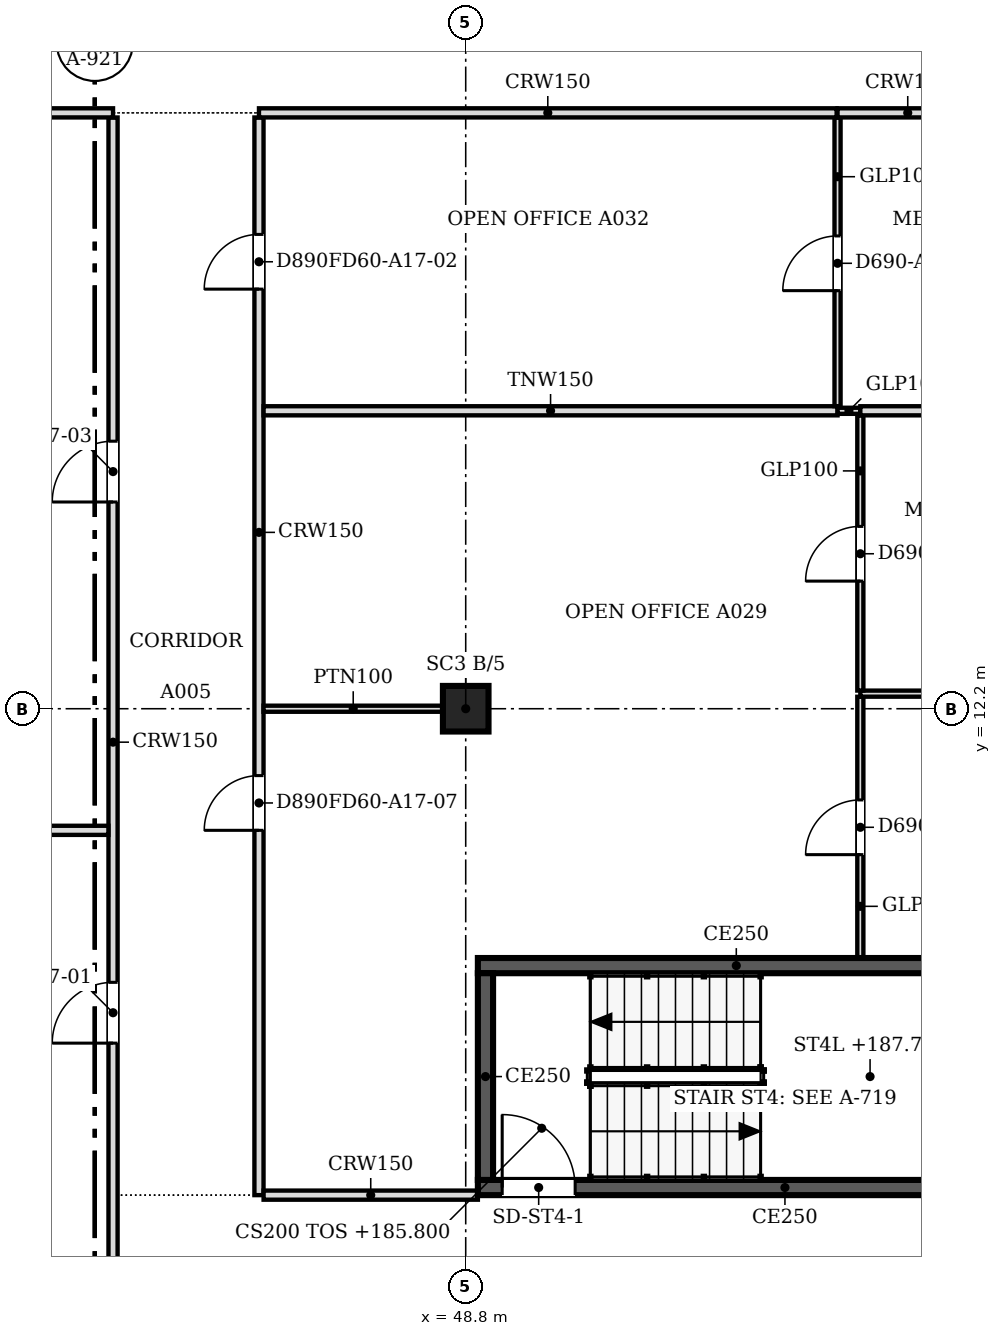
"""IFC4 building model, lengths in metres.
Left out: names, types, materials, properties, quantities, classifications, styles, units other than length and angle.
Written with IfcOpenShell. Run it as: python <this file> out.ifc"""

import sys

from ifc_helpers import new_model, si_unit, direction, frame, frame_2d, origin, origin_2d, place, context, subcontext, project, spatial, rectangle, extrude, source, transform, mapped, element, fill, save


model = new_model("IFC4")
c1 = context("Model", 3, precision=1e-05, world=origin(), true_north=direction((0.0, 1.0)))
c2 = subcontext(c1, "Body", "Model", "MODEL_VIEW")
j1 = project(units=[si_unit("LENGTHUNIT", "METRE"), si_unit("PLANEANGLEUNIT", "RADIAN")], contexts=[c1])
p1 = place(None, origin())
s1 = spatial("IfcSite", under=j1, at=p1, CompositionType="ELEMENT")
p2 = place(p1, origin())
s2 = spatial("IfcBuilding", under=s1, at=p2, CompositionType="ELEMENT")
p3 = place(p2, frame((0.0, 0.0, 185.8)))
s3 = spatial("IfcBuildingStorey", under=s2, at=p3, CompositionType="ELEMENT", Elevation=185.8)
p4 = place(p3, frame((48.8, 12.2, 0.0), z_axis=(0.0, 0.0, 1.0), x_axis=(1.0, 0.0, 0.0)))
e1 = element("IfcColumn", 1, at=p4, inside=s3, PredefinedType="COLUMN", context=c2, shape_type="SweptSolid", body=[
    extrude(rectangle(XDim=0.75, YDim=0.75, at=origin_2d()), origin(), (0.0, 0.0, 1.0), 3.6),
])
p5 = place(p3, frame((57.5, 4.325, 0.0), z_axis=(0.0, 0.0, 1.0), x_axis=(-1.0, 0.0, 0.0)))
e2 = element("IfcWall", 2, at=p5, inside=s3, PredefinedType="SOLIDWALL", context=c2, shape_type="SweptSolid", body=[
    extrude(rectangle(XDim=8.5, YDim=0.25, at=frame_2d((4.25, 0.0))), origin(), (0.0, 0.0, 1.0), 3.8),
])
m1 = source(origin(), c2, "Body", "SweptSolid", [
    extrude(rectangle(XDim=1.2, YDim=2.1, at=frame_2d((0.6, 1.05))), frame((0.0, 0.135, 0.0), z_axis=(0.0, -1.0, 0.0), x_axis=(1.0, 0.0, 0.0)), (0.0, 0.0, 1.0), 0.27),
])
p6 = place(p5, frame((6.9, 0.0, 0.0)))
e3 = element("IfcOpeningElement", 3, at=p6, cuts=e2, PredefinedType="OPENING", context=c2, shape_type="MappedRepresentation", body=[
    mapped(m1, transform((0.0, 0.0, 0.0), scale=1.0)),
])
p7 = place(p3, frame((49.125, 4.45, 0.0), z_axis=(0.0, 0.0, 1.0), x_axis=(0.0, 1.0, 0.0)))
e4 = element("IfcWall", 4, at=p7, inside=s3, PredefinedType="SOLIDWALL", context=c2, shape_type="SweptSolid", body=[
    extrude(rectangle(XDim=3.4, YDim=0.25, at=frame_2d((1.7, 0.0))), origin(), (0.0, 0.0, 1.0), 3.8),
])
p8 = place(p3, frame((49.0, 7.975, 0.0), z_axis=(0.0, 0.0, 1.0), x_axis=(1.0, 0.0, 0.0)))
e5 = element("IfcWall", 5, at=p8, inside=s3, PredefinedType="SOLIDWALL", context=c2, shape_type="SweptSolid", body=[
    extrude(rectangle(XDim=8.5, YDim=0.25, at=frame_2d((4.25, 0.0))), origin(), (0.0, 0.0, 1.0), 3.8),
])
p9 = place(p3, frame((43.0, 0.5, 0.0), z_axis=(0.0, 0.0, 1.0), x_axis=(0.0, 1.0, 0.0)))
e6 = element("IfcWall", 6, at=p9, inside=s3, PredefinedType="PARTITIONING", context=c2, shape_type="SweptSolid", body=[
    extrude(rectangle(XDim=21.424, YDim=0.15, at=frame_2d((10.712, 0.0))), origin(), (0.0, 0.0, 1.0), 3.067),
])
m2 = source(origin(), c2, "Body", "SweptSolid", [
    extrude(rectangle(XDim=1.0, YDim=2.1, at=frame_2d((0.5, 1.05))), frame((0.0, 0.085, 0.0), z_axis=(0.0, -1.0, 0.0), x_axis=(1.0, 0.0, 0.0)), (0.0, 0.0, 1.0), 0.17),
])
p10 = place(p9, frame((6.2, 0.0, 0.0)))
e7 = element("IfcOpeningElement", 7, at=p10, cuts=e6, PredefinedType="OPENING", context=c2, shape_type="MappedRepresentation", body=[
    mapped(m2, transform((0.0, 0.0, 0.0), scale=1.0)),
])
p11 = place(p9, frame((15.1, 0.0, 0.0)))
e8 = element("IfcOpeningElement", 8, at=p11, cuts=e6, PredefinedType="OPENING", context=c2, shape_type="MappedRepresentation", body=[
    mapped(m2, transform((0.0, 0.0, 0.0), scale=1.0)),
])
p12 = place(p3, frame((45.4, 21.924, 0.0), z_axis=(0.0, 0.0, 1.0), x_axis=(0.0, -1.0, 0.0)))
e9 = element("IfcWall", 9, at=p12, inside=s3, PredefinedType="PARTITIONING", context=c2, shape_type="SweptSolid", body=[
    extrude(rectangle(XDim=17.724, YDim=0.15, at=frame_2d((8.862, 0.0))), origin(), (0.0, 0.0, 1.0), 3.067),
])
m3 = source(origin(), c2, "Body", "SweptSolid", [
    extrude(rectangle(XDim=0.9, YDim=2.1, at=frame_2d((0.45, 1.05))), frame((0.0, 0.085, 0.0), z_axis=(0.0, -1.0, 0.0), x_axis=(1.0, 0.0, 0.0)), (0.0, 0.0, 1.0), 0.17),
])
p13 = place(p12, frame((1.923, 0.0, 0.0)))
e10 = element("IfcOpeningElement", 10, at=p13, cuts=e9, PredefinedType="OPENING", context=c2, shape_type="MappedRepresentation", body=[
    mapped(m3, transform((0.0, 0.0, 0.0), scale=1.0)),
])
p14 = place(p12, frame((10.824, 0.0, 0.0)))
e11 = element("IfcOpeningElement", 11, at=p14, cuts=e9, PredefinedType="OPENING", context=c2, shape_type="MappedRepresentation", body=[
    mapped(m3, transform((0.0, 0.0, 0.0), scale=1.0)),
])
p15 = place(p3, frame((45.476, 4.2, 0.0), z_axis=(0.0, 0.0, 1.0), x_axis=(1.0, 0.0, 0.0)))
e12 = element("IfcWall", 12, at=p15, inside=s3, PredefinedType="PARTITIONING", context=c2, shape_type="SweptSolid", body=[
    extrude(rectangle(XDim=3.524, YDim=0.15, at=frame_2d((1.762, 0.0))), origin(), (0.0, 0.0, 1.0), 3.067),
])
p16 = place(p3, frame((55.29, 12.397, 0.0), z_axis=(0.0, 0.0, 1.0), x_axis=(0.0, -1.0, 0.0)))
e13 = element("IfcWall", 13, at=p16, inside=s3, PredefinedType="PARTITIONING", context=c2, shape_type="SweptSolid", body=[
    extrude(rectangle(XDim=4.297, YDim=0.1, at=frame_2d((2.148, 0.0))), origin(), (0.0, 0.0, 1.0), 3.067),
])
m4 = source(origin(), c2, "Body", "SweptSolid", [
    extrude(rectangle(XDim=0.9, YDim=2.1, at=frame_2d((0.45, 1.05))), frame((0.0, 0.06, 0.0), z_axis=(0.0, -1.0, 0.0), x_axis=(1.0, 0.0, 0.0)), (0.0, 0.0, 1.0), 0.12),
])
p17 = place(p16, frame((1.697, 0.0, 0.0)))
e14 = element("IfcOpeningElement", 14, at=p17, cuts=e13, PredefinedType="OPENING", context=c2, shape_type="MappedRepresentation", body=[
    mapped(m4, transform((0.0, 0.0, 0.0), scale=1.0)),
])
p18 = place(p3, frame((24.9, 10.2, 0.0), z_axis=(0.0, 0.0, 1.0), x_axis=(1.0, 0.0, 0.0)))
e15 = element("IfcWall", 15, at=p18, inside=s3, PredefinedType="PARTITIONING", context=c2, shape_type="SweptSolid", body=[
    extrude(rectangle(XDim=18.024, YDim=0.15, at=frame_2d((9.012, 0.0))), origin(), (0.0, 0.0, 1.0), 3.067),
])
p19 = place(p3, frame((48.425, 12.2, 0.0), z_axis=(0.0, 0.0, 1.0), x_axis=(-1.0, 0.0, 0.0)))
e16 = element("IfcWall", 16, at=p19, inside=s3, PredefinedType="PARTITIONING", context=c2, shape_type="SweptSolid", body=[
    extrude(rectangle(XDim=2.95, YDim=0.1, at=frame_2d((1.475, 0.0))), origin(), (0.0, 0.0, 1.0), 3.067),
])
p20 = place(p3, frame((55.29, 12.448, 0.0), z_axis=(0.0, 0.0, 1.0), x_axis=(1.0, 0.0, 0.0)))
e17 = element("IfcWall", 17, at=p20, inside=s3, PredefinedType="PARTITIONING", context=c2, shape_type="SweptSolid", body=[
    extrude(rectangle(XDim=5.21, YDim=0.1, at=frame_2d((2.605, 0.0))), origin(), (0.0, 0.0, 1.0), 3.067),
])
p21 = place(p3, frame((55.29, 17.024, 0.0), z_axis=(0.0, 0.0, 1.0), x_axis=(0.0, -1.0, 0.0)))
e18 = element("IfcWall", 18, at=p21, inside=s3, PredefinedType="PARTITIONING", context=c2, shape_type="SweptSolid", body=[
    extrude(rectangle(XDim=4.525, YDim=0.1, at=frame_2d((2.263, 0.0))), origin(), (0.0, 0.0, 1.0), 3.067),
])
p22 = place(p21, frame((1.825, 0.0, 0.0)))
e19 = element("IfcOpeningElement", 19, at=p22, cuts=e18, PredefinedType="OPENING", context=c2, shape_type="MappedRepresentation", body=[
    mapped(m4, transform((0.0, 0.0, 0.0), scale=1.0)),
])
p23 = place(p3, frame((45.476, 17.1, 0.0), z_axis=(0.0, 0.0, 1.0), x_axis=(1.0, 0.0, 0.0)))
e20 = element("IfcWall", 20, at=p23, inside=s3, PredefinedType="PARTITIONING", context=c2, shape_type="SweptSolid", body=[
    extrude(rectangle(XDim=9.439, YDim=0.15, at=frame_2d((4.719, 0.0))), origin(), (0.0, 0.0, 1.0), 3.067),
])
p24 = place(p3, frame((54.916, 17.1, 0.0), z_axis=(0.0, 0.0, 1.0), x_axis=(1.0, 0.0, 0.0)))
e21 = element("IfcWall", 21, at=p24, inside=s3, PredefinedType="PARTITIONING", context=c2, shape_type="SweptSolid", body=[
    extrude(rectangle(XDim=0.373, YDim=0.1, at=frame_2d((0.187, 0.0))), origin(), (0.0, 0.0, 1.0), 3.067),
])
p25 = place(p3, frame((55.29, 17.1, 0.0), z_axis=(0.0, 0.0, 1.0), x_axis=(1.0, 0.0, 0.0)))
e22 = element("IfcWall", 22, at=p25, inside=s3, PredefinedType="PARTITIONING", context=c2, shape_type="SweptSolid", body=[
    extrude(rectangle(XDim=5.21, YDim=0.15, at=frame_2d((2.605, 0.0))), origin(), (0.0, 0.0, 1.0), 3.067),
])
p26 = place(p3, frame((54.915, 21.924, 0.0), z_axis=(0.0, 0.0, 1.0), x_axis=(0.0, -1.0, 0.0)))
e23 = element("IfcWall", 23, at=p26, inside=s3, PredefinedType="PARTITIONING", context=c2, shape_type="SweptSolid", body=[
    extrude(rectangle(XDim=4.748, YDim=0.1, at=frame_2d((2.374, 0.0))), origin(), (0.0, 0.0, 1.0), 3.067),
])
p27 = place(p26, frame((1.948, 0.0, 0.0)))
e24 = element("IfcOpeningElement", 24, at=p27, cuts=e23, PredefinedType="OPENING", context=c2, shape_type="MappedRepresentation", body=[
    mapped(m4, transform((0.0, 0.0, 0.0), scale=1.0)),
])
p28 = place(p3, frame((30.5, 22.0, 0.0), z_axis=(0.0, 0.0, 1.0), x_axis=(1.0, 0.0, 0.0)))
e25 = element("IfcWall", 25, at=p28, inside=s3, PredefinedType="PARTITIONING", context=c2, shape_type="SweptSolid", body=[
    extrude(rectangle(XDim=12.5, YDim=0.15, at=frame_2d((6.25, 0.0))), origin(), (0.0, 0.0, 1.0), 3.067),
])
p29 = place(p3, frame((45.4, 22.0, 0.0), z_axis=(0.0, 0.0, 1.0), x_axis=(1.0, 0.0, 0.0)))
e26 = element("IfcWall", 26, at=p29, inside=s3, PredefinedType="PARTITIONING", context=c2, shape_type="SweptSolid", body=[
    extrude(rectangle(XDim=9.5, YDim=0.15, at=frame_2d((4.75, 0.0))), origin(), (0.0, 0.0, 1.0), 3.067),
])
p30 = place(p3, frame((54.915, 22.0, 0.0), z_axis=(0.0, 0.0, 1.0), x_axis=(1.0, 0.0, 0.0)))
e27 = element("IfcWall", 27, at=p30, inside=s3, PredefinedType="PARTITIONING", context=c2, shape_type="SweptSolid", body=[
    extrude(rectangle(XDim=2.309, YDim=0.15, at=frame_2d((1.155, 0.0))), origin(), (0.0, 0.0, 1.0), 3.067),
])
m5 = source(origin(), c2, "Body", "SweptSolid", [
    extrude(rectangle(XDim=1.2, YDim=2.1, at=frame_2d((0.6, 1.05))), frame((0.0, 0.025, 0.0), z_axis=(0.0, -1.0, 0.0), x_axis=(1.0, 0.0, 0.0)), (0.0, 0.0, 1.0), 0.05),
])
p31 = place(p6, origin())
e28 = element("IfcDoor", 28, at=p31, inside=s3, OperationType="SINGLE_SWING_RIGHT", PredefinedType="DOOR", context=c2, shape_type="MappedRepresentation", body=[
    mapped(m5, transform((0.0, 0.0, 0.0), scale=1.0)),
])
fill(e3, e28)
m6 = source(origin(), c2, "Body", "SweptSolid", [
    extrude(rectangle(XDim=0.9, YDim=2.1, at=frame_2d((0.45, 1.05))), frame((0.0, 0.025, 0.0), z_axis=(0.0, -1.0, 0.0), x_axis=(1.0, 0.0, 0.0)), (0.0, 0.0, 1.0), 0.05),
])
p32 = place(p17, origin())
e29 = element("IfcDoor", 29, at=p32, inside=s3, OperationType="SINGLE_SWING_RIGHT", PredefinedType="DOOR", context=c2, shape_type="MappedRepresentation", body=[
    mapped(m6, transform((0.0, 0.0, 0.0), scale=1.0)),
])
fill(e14, e29)
p33 = place(p22, origin())
e30 = element("IfcDoor", 30, at=p33, inside=s3, OperationType="SINGLE_SWING_RIGHT", PredefinedType="DOOR", context=c2, shape_type="MappedRepresentation", body=[
    mapped(m6, transform((0.0, 0.0, 0.0), scale=1.0)),
])
fill(e19, e30)
p34 = place(p27, origin())
e31 = element("IfcDoor", 31, at=p34, inside=s3, OperationType="SINGLE_SWING_RIGHT", PredefinedType="DOOR", context=c2, shape_type="MappedRepresentation", body=[
    mapped(m6, transform((0.0, 0.0, 0.0), scale=1.0)),
])
fill(e24, e31)
p35 = place(p13, origin())
e32 = element("IfcDoor", 32, at=p35, inside=s3, OperationType="SINGLE_SWING_RIGHT", PredefinedType="DOOR", context=c2, shape_type="MappedRepresentation", body=[
    mapped(m6, transform((0.0, 0.0, 0.0), scale=1.0)),
])
fill(e10, e32)
m7 = source(origin(), c2, "Body", "SweptSolid", [
    extrude(rectangle(XDim=1.0, YDim=2.1, at=frame_2d((0.5, 1.05))), frame((0.0, 0.025, 0.0), z_axis=(0.0, -1.0, 0.0), x_axis=(1.0, 0.0, 0.0)), (0.0, 0.0, 1.0), 0.05),
])
p36 = place(p10, origin())
e33 = element("IfcDoor", 33, at=p36, inside=s3, OperationType="SINGLE_SWING_LEFT", PredefinedType="DOOR", context=c2, shape_type="MappedRepresentation", body=[
    mapped(m7, transform((0.0, 0.0, 0.0), scale=1.0)),
])
fill(e7, e33)
p37 = place(p11, origin())
e34 = element("IfcDoor", 34, at=p37, inside=s3, OperationType="SINGLE_SWING_LEFT", PredefinedType="DOOR", context=c2, shape_type="MappedRepresentation", body=[
    mapped(m7, transform((0.0, 0.0, 0.0), scale=1.0)),
])
fill(e8, e34)
p38 = place(p14, origin())
e35 = element("IfcDoor", 35, at=p38, inside=s3, OperationType="SINGLE_SWING_RIGHT", PredefinedType="DOOR", context=c2, shape_type="MappedRepresentation", body=[
    mapped(m6, transform((0.0, 0.0, 0.0), scale=1.0)),
])
fill(e11, e35)
save(model, sys.argv[1])
